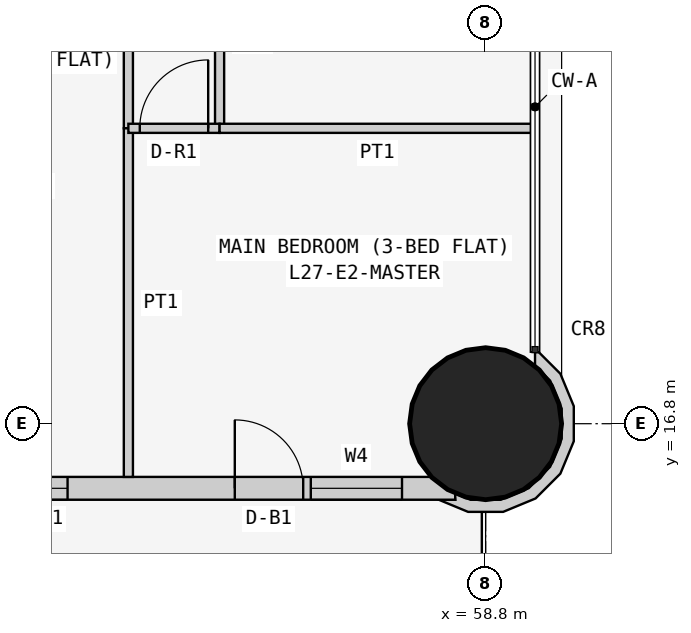
"""IFC4 building model, lengths in metres.
Left out: names, types, materials, properties, quantities, classifications, styles, units other than length and angle.
Written with IfcOpenShell. Run it as: python <this file> out.ifc"""

import sys

from ifc_helpers import new_model, si_unit, direction, frame, frame_2d, origin, origin_2d, place, context, subcontext, project, spatial, polyline, rectangle, circle, outline, extrude, element, fill, save


model = new_model("IFC4")
c1 = context("Model", 3, precision=1e-05, world=origin(), true_north=direction((0.0, 1.0)))
c2 = subcontext(c1, "Body", "Model", "MODEL_VIEW")
j1 = project(units=[si_unit("LENGTHUNIT", "METRE"), si_unit("PLANEANGLEUNIT", "RADIAN")], contexts=[c1])
p1 = place(None, origin())
s1 = spatial("IfcSite", under=j1, at=p1, CompositionType="ELEMENT")
p2 = place(p1, origin())
s2 = spatial("IfcBuilding", under=s1, at=p2, CompositionType="ELEMENT")
p3 = place(p2, frame((0.0, 0.0, 108.9)))
s3 = spatial("IfcBuildingStorey", under=s2, at=p3, CompositionType="ELEMENT", Elevation=108.9)
p4 = place(p3, frame((58.8, 16.8, 0.0), z_axis=(0.0, 0.0, 1.0), x_axis=(1.0, 0.0, 0.0)))
e1 = element("IfcColumn", 1, at=p4, inside=s3, PredefinedType="COLUMN", context=c2, shape_type="SweptSolid", body=[
    extrude(circle(Radius=1.0, at=origin_2d()), origin(), (0.0, 0.0, 1.0), 3.6),
])
p5 = place(p3, frame((43.0, 15.95, 0.0), z_axis=(0.0, 0.0, 1.0), x_axis=(1.0, 0.0, 0.0)))
e2 = element("IfcWall", 2, at=p5, inside=s3, PredefinedType="SOLIDWALL", context=c2, shape_type="SweptSolid", body=[
    extrude(rectangle(XDim=15.4, YDim=0.3, at=frame_2d((7.7, 0.0))), origin(), (0.0, 0.0, 1.0), 3.45),
])
p6 = place(p5, frame((1.2, 0.0, 0.9)))
e3 = element("IfcOpeningElement", 3, at=p6, cuts=e2, PredefinedType="OPENING", context=c2, shape_type="SweptSolid", body=[
    extrude(rectangle(XDim=1.8, YDim=1.5, at=frame_2d((0.9, 0.75))), frame((0.0, 0.16, 0.0), z_axis=(0.0, -1.0, 0.0), x_axis=(1.0, 0.0, 0.0)), (0.0, 0.0, 1.0), 0.32),
])
p7 = place(p5, frame((4.95, 0.0, 1.5)))
e4 = element("IfcOpeningElement", 4, at=p7, cuts=e2, PredefinedType="OPENING", context=c2, shape_type="SweptSolid", body=[
    extrude(rectangle(XDim=0.9, YDim=0.7, at=frame_2d((0.45, 0.35))), frame((0.0, 0.16, 0.0), z_axis=(0.0, -1.0, 0.0), x_axis=(1.0, 0.0, 0.0)), (0.0, 0.0, 1.0), 0.32),
])
p8 = place(p5, frame((8.5, 0.0, 0.9)))
e5 = element("IfcOpeningElement", 5, at=p8, cuts=e2, PredefinedType="OPENING", context=c2, shape_type="SweptSolid", body=[
    extrude(rectangle(XDim=1.8, YDim=1.5, at=frame_2d((0.9, 0.75))), frame((0.0, 0.16, 0.0), z_axis=(0.0, -1.0, 0.0), x_axis=(1.0, 0.0, 0.0)), (0.0, 0.0, 1.0), 0.32),
])
p9 = place(p5, frame((12.5, 0.0, 0.0)))
e6 = element("IfcOpeningElement", 6, at=p9, cuts=e2, PredefinedType="OPENING", context=c2, shape_type="SweptSolid", body=[
    extrude(rectangle(XDim=0.9, YDim=2.4, at=frame_2d((0.45, 1.2))), frame((0.0, 0.16, 0.0), z_axis=(0.0, -1.0, 0.0), x_axis=(1.0, 0.0, 0.0)), (0.0, 0.0, 1.0), 0.32),
])
p10 = place(p5, frame((13.5, 0.0, 0.9)))
e7 = element("IfcOpeningElement", 7, at=p10, cuts=e2, PredefinedType="OPENING", context=c2, shape_type="SweptSolid", body=[
    extrude(rectangle(XDim=1.2, YDim=1.5, at=frame_2d((0.6, 0.75))), frame((0.0, 0.16, 0.0), z_axis=(0.0, -1.0, 0.0), x_axis=(1.0, 0.0, 0.0)), (0.0, 0.0, 1.0), 0.32),
])
p11 = place(p3, frame((58.233, 15.881, 0.0), z_axis=(0.0, 0.0, 1.0), x_axis=(0.831199417842, -0.555974394895, 0.0)))
e8 = element("IfcWall", 8, at=p11, inside=s3, PredefinedType="SOLIDWALL", context=c2, shape_type="SweptSolid", body=[
    extrude(outline(polyline([(0.075, 2.077), (0.351, 2.022), (0.682, 1.801), (0.903, 1.47), (0.981, 1.08), (0.903, 0.689), (0.682, 0.358), (0.351, 0.137), (0.126, 0.092), (0.184, 0.026), (0.004, -0.095), (0.414, -0.013), (0.797, 0.243), (1.053, 0.627), (1.143, 1.08), (1.053, 1.532), (0.796, 1.916), (0.413, 2.172), (0.017, 2.251), (-0.023, 2.224), (0.075, 2.077)])), origin(), (0.0, 0.0, 1.0), 3.45),
])
p12 = place(p3, frame((54.1, 22.971, 0.0), z_axis=(0.0, 0.0, 1.0), x_axis=(0.0, -1.0, 0.0)))
e9 = element("IfcWall", 9, at=p12, inside=s3, PredefinedType="PARTITIONING", context=c2, shape_type="SweptSolid", body=[
    extrude(rectangle(XDim=2.285, YDim=0.12, at=frame_2d((1.143, 0.0))), origin(), (0.0, 0.0, 1.0), 3.45),
])
p13 = place(p3, frame((54.1, 20.686, 0.0), z_axis=(0.0, 0.0, 1.0), x_axis=(0.0, -1.0, 0.0)))
e10 = element("IfcWall", 10, at=p13, inside=s3, PredefinedType="PARTITIONING", context=c2, shape_type="SweptSolid", body=[
    extrude(rectangle(XDim=4.586, YDim=0.12, at=frame_2d((2.293, 0.0))), origin(), (0.0, 0.0, 1.0), 3.45),
])
p14 = place(p3, frame((55.3, 22.971, 0.0), z_axis=(0.0, 0.0, 1.0), x_axis=(0.0, -1.0, 0.0)))
e11 = element("IfcWall", 11, at=p14, inside=s3, PredefinedType="PARTITIONING", context=c2, shape_type="SweptSolid", body=[
    extrude(rectangle(XDim=2.285, YDim=0.12, at=frame_2d((1.143, 0.0))), origin(), (0.0, 0.0, 1.0), 3.45),
])
p15 = place(p3, frame((55.3, 20.686, 0.0), z_axis=(0.0, 0.0, 1.0), x_axis=(-1.0, 0.0, 0.0)))
e12 = element("IfcWall", 12, at=p15, inside=s3, PredefinedType="PARTITIONING", context=c2, shape_type="SweptSolid", body=[
    extrude(rectangle(XDim=1.2, YDim=0.12, at=frame_2d((0.6, 0.0))), origin(), (0.0, 0.0, 1.0), 3.45),
])
p16 = place(p15, frame((0.15, 0.0, 0.0)))
e13 = element("IfcOpeningElement", 13, at=p16, cuts=e12, PredefinedType="OPENING", context=c2, shape_type="SweptSolid", body=[
    extrude(rectangle(XDim=0.9, YDim=2.1, at=frame_2d((0.45, 1.05))), frame((0.0, 0.07, 0.0), z_axis=(0.0, -1.0, 0.0), x_axis=(1.0, 0.0, 0.0)), (0.0, 0.0, 1.0), 0.14),
])
p17 = place(p3, frame((59.45, 20.686, 0.0), z_axis=(0.0, 0.0, 1.0), x_axis=(-1.0, 0.0, 0.0)))
e14 = element("IfcWall", 14, at=p17, inside=s3, PredefinedType="PARTITIONING", context=c2, shape_type="SweptSolid", body=[
    extrude(rectangle(XDim=4.15, YDim=0.12, at=frame_2d((2.075, 0.0))), origin(), (0.0, 0.0, 1.0), 3.45),
])
p18 = place(p8, origin())
e15 = element("IfcWindow", 15, at=p18, inside=s3, PartitioningType="SINGLE_PANEL", PredefinedType="WINDOW", context=c2, shape_type="SweptSolid", body=[
    extrude(rectangle(XDim=1.8, YDim=1.5, at=frame_2d((0.9, 0.75))), frame((0.0, 0.03, 0.0), z_axis=(0.0, -1.0, 0.0), x_axis=(1.0, 0.0, 0.0)), (0.0, 0.0, 1.0), 0.06),
])
fill(e5, e15)
p19 = place(p9, origin())
e16 = element("IfcDoor", 16, at=p19, inside=s3, OperationType="SINGLE_SWING_LEFT", PredefinedType="DOOR", context=c2, shape_type="SweptSolid", body=[
    extrude(rectangle(XDim=0.9, YDim=2.4, at=frame_2d((0.45, 1.2))), frame((0.0, 0.025, 0.0), z_axis=(0.0, -1.0, 0.0), x_axis=(1.0, 0.0, 0.0)), (0.0, 0.0, 1.0), 0.05),
])
fill(e6, e16)
p20 = place(p10, origin())
e17 = element("IfcWindow", 17, at=p20, inside=s3, PartitioningType="SINGLE_PANEL", PredefinedType="WINDOW", context=c2, shape_type="SweptSolid", body=[
    extrude(rectangle(XDim=1.2, YDim=1.5, at=frame_2d((0.6, 0.75))), frame((0.0, 0.03, 0.0), z_axis=(0.0, -1.0, 0.0), x_axis=(1.0, 0.0, 0.0)), (0.0, 0.0, 1.0), 0.06),
])
fill(e7, e17)
p21 = place(p16, frame((0.9, 0.0, 0.0), z_axis=(0.0, 0.0, 1.0), x_axis=(-1.0, 0.0, 0.0)))
e18 = element("IfcDoor", 18, at=p21, inside=s3, OperationType="SINGLE_SWING_RIGHT", PredefinedType="DOOR", context=c2, shape_type="SweptSolid", body=[
    extrude(rectangle(XDim=0.9, YDim=2.1, at=frame_2d((0.45, 1.05))), frame((0.0, 0.025, 0.0), z_axis=(0.0, -1.0, 0.0), x_axis=(1.0, 0.0, 0.0)), (0.0, 0.0, 1.0), 0.05),
])
fill(e13, e18)
save(model, sys.argv[1])
